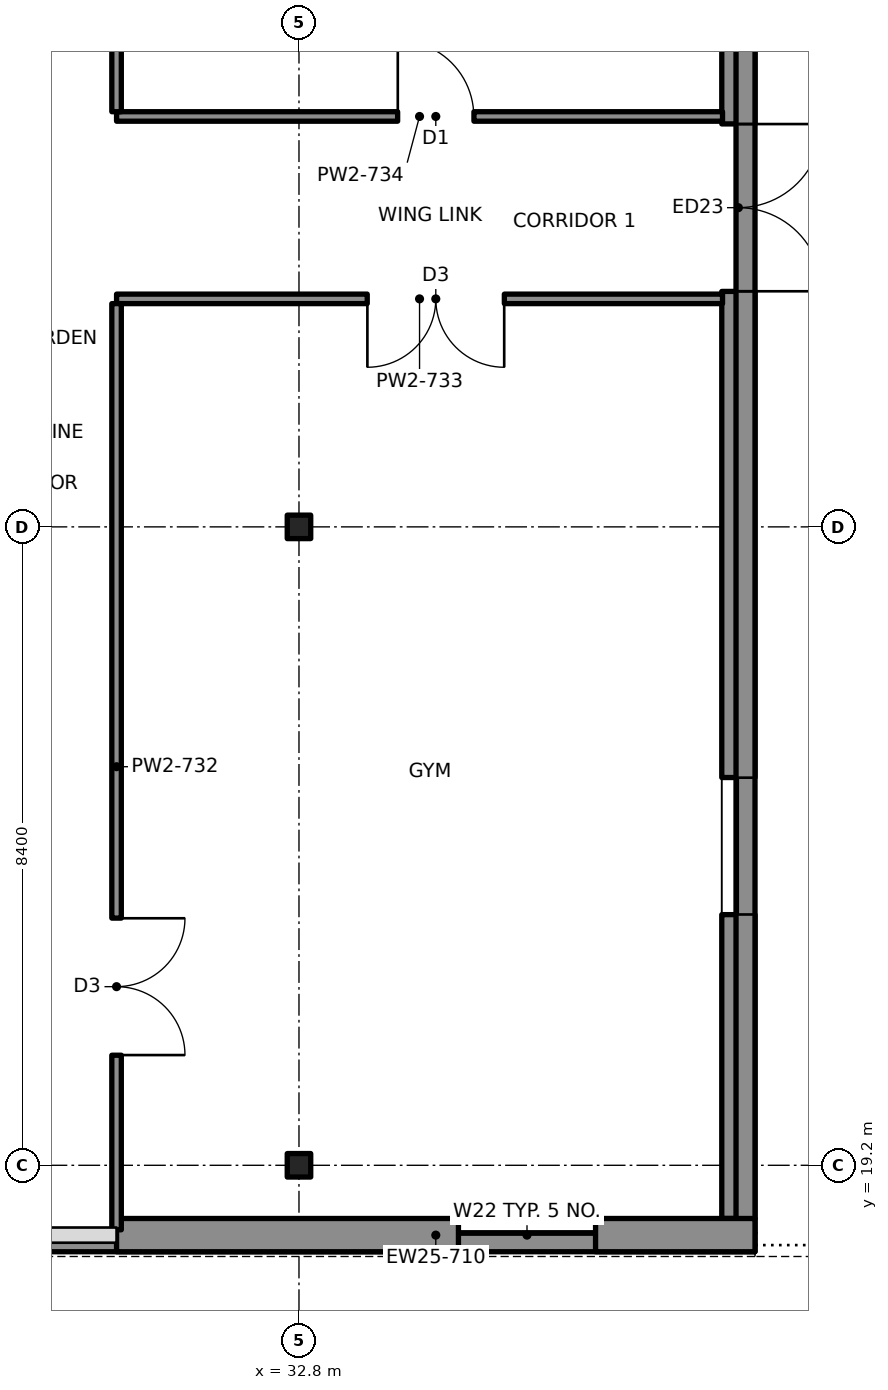
"""IFC4 building model, lengths in metres.
Left out: names, types, materials, properties, quantities, classifications, styles, units other than length and angle.
Written with IfcOpenShell. Run it as: python <this file> out.ifc"""

import sys

from ifc_helpers import new_model, si_unit, direction, frame, frame_2d, origin, origin_2d, place, context, subcontext, project, spatial, rectangle, i_section, extrude, element, fill, save


model = new_model("IFC4")
c1 = context("Model", 3, precision=1e-05, world=origin(), true_north=direction((0.0, 1.0)))
c2 = subcontext(c1, "Body", "Model", "MODEL_VIEW")
j1 = project(units=[si_unit("LENGTHUNIT", "METRE"), si_unit("PLANEANGLEUNIT", "RADIAN")], contexts=[c1])
p1 = place(None, origin())
s1 = spatial("IfcSite", under=j1, at=p1, CompositionType="ELEMENT")
p2 = place(p1, origin())
s2 = spatial("IfcBuilding", under=s1, at=p2, CompositionType="ELEMENT")
p3 = place(p2, frame((0.0, 0.0, 14.0)))
s3 = spatial("IfcBuildingStorey", under=s2, at=p3, CompositionType="ELEMENT", Elevation=14.0)
for number, where, z_axis, x_axis in (
    (1, (32.8, 19.2, 0.0), (0.0, 0.0, 1.0), (1.0, 0.0, 0.0)),
    (2, (32.8, 27.6, 0.0), (0.0, 0.0, 1.0), (1.0, 0.0, 0.0)),
):
    element("IfcColumn", number, at=place(p3, frame(where, z_axis=z_axis, x_axis=x_axis)), inside=s3, PredefinedType="COLUMN", context=c2, shape_type="SweptSolid", body=[
        extrude(i_section(OverallWidth=0.309, OverallDepth=0.323, WebThickness=0.014, FlangeThickness=0.023, at=origin_2d()), origin(), (0.0, 0.0, 1.0), 4.4),
    ])
p4 = place(p3, frame((30.4, 18.281, 0.0), z_axis=(0.0, 0.0, 1.0), x_axis=(1.0, 0.0, 0.0)))
e3 = element("IfcWall", 3, at=p4, inside=s3, PredefinedType="SOLIDWALL", context=c2, shape_type="SweptSolid", body=[
    extrude(rectangle(XDim=8.4, YDim=0.438, at=frame_2d((4.2, 0.0))), origin(), (0.0, 0.0, 1.0), 4.4),
])
p5 = place(p4, frame((4.5, 0.0, 0.75)))
e4 = element("IfcOpeningElement", 4, at=p5, cuts=e3, PredefinedType="OPENING", context=c2, shape_type="SweptSolid", body=[
    extrude(rectangle(XDim=1.8, YDim=2.8, at=frame_2d((0.9, 1.4))), frame((0.0, 0.229, 0.0), z_axis=(0.0, -1.0, 0.0), x_axis=(1.0, 0.0, 0.0)), (0.0, 0.0, 1.0), 0.458),
])
p6 = place(p3, frame((38.581, 18.5, 0.0), z_axis=(0.0, 0.0, 1.0), x_axis=(0.0, 1.0, 0.0)))
e5 = element("IfcWall", 5, at=p6, inside=s3, PredefinedType="SOLIDWALL", context=c2, shape_type="SweptSolid", body=[
    extrude(rectangle(XDim=35.0, YDim=0.438, at=frame_2d((17.5, 0.0))), origin(), (0.0, 0.0, 1.0), 4.4),
])
p7 = place(p6, frame((16.6, 0.0, 0.75)))
e6 = element("IfcOpeningElement", 6, at=p7, cuts=e5, PredefinedType="OPENING", context=c2, shape_type="SweptSolid", body=[
    extrude(rectangle(XDim=1.8, YDim=2.8, at=frame_2d((0.9, 1.4))), frame((0.0, 0.229, 0.0), z_axis=(0.0, -1.0, 0.0), x_axis=(1.0, 0.0, 0.0)), (0.0, 0.0, 1.0), 0.458),
])
p8 = place(p6, frame((4.0, 0.0, 0.75)))
e7 = element("IfcOpeningElement", 7, at=p8, cuts=e5, PredefinedType="OPENING", context=c2, shape_type="SweptSolid", body=[
    extrude(rectangle(XDim=1.8, YDim=2.8, at=frame_2d((0.9, 1.4))), frame((0.0, 0.229, 0.0), z_axis=(0.0, -1.0, 0.0), x_axis=(1.0, 0.0, 0.0)), (0.0, 0.0, 1.0), 0.458),
])
p9 = place(p6, frame((31.2, 0.0, 0.75)))
e8 = element("IfcOpeningElement", 8, at=p9, cuts=e5, PredefinedType="OPENING", context=c2, shape_type="SweptSolid", body=[
    extrude(rectangle(XDim=1.8, YDim=2.8, at=frame_2d((0.9, 1.4))), frame((0.0, 0.229, 0.0), z_axis=(0.0, -1.0, 0.0), x_axis=(1.0, 0.0, 0.0)), (0.0, 0.0, 1.0), 0.458),
])
p10 = place(p6, frame((12.2, 0.0, 0.0)))
e9 = element("IfcOpeningElement", 9, at=p10, cuts=e5, PredefinedType="OPENING", context=c2, shape_type="SweptSolid", body=[
    extrude(rectangle(XDim=2.2, YDim=2.4, at=frame_2d((1.1, 1.2))), frame((0.0, 0.229, 0.0), z_axis=(0.0, -1.0, 0.0), x_axis=(1.0, 0.0, 0.0)), (0.0, 0.0, 1.0), 0.458),
])
p11 = place(p6, frame((20.6, 0.0, 0.0)))
e10 = element("IfcOpeningElement", 10, at=p11, cuts=e5, PredefinedType="OPENING", context=c2, shape_type="SweptSolid", body=[
    extrude(rectangle(XDim=2.2, YDim=2.4, at=frame_2d((1.1, 1.2))), frame((0.0, 0.229, 0.0), z_axis=(0.0, -1.0, 0.0), x_axis=(1.0, 0.0, 0.0)), (0.0, 0.0, 1.0), 0.458),
])
p12 = place(p3, frame((10.062, 18.188, 4.4), z_axis=(0.0, 0.0, 1.0), x_axis=(1.0, 0.0, 0.0)))
e11 = element("IfcWall", 11, at=p12, inside=s3, PredefinedType="PARAPET", context=c2, shape_type="SweptSolid", body=[
    extrude(rectangle(XDim=28.738, YDim=0.25, at=frame_2d((14.369, 0.0))), origin(), (0.0, 0.0, 1.0), 1.1),
])
p13 = place(p3, frame((38.675, 18.312, 4.4), z_axis=(0.0, 0.0, 1.0), x_axis=(0.0, 1.0, 0.0)))
e12 = element("IfcWall", 12, at=p13, inside=s3, PredefinedType="PARAPET", context=c2, shape_type="SweptSolid", body=[
    extrude(rectangle(XDim=35.375, YDim=0.25, at=frame_2d((17.688, 0.0))), origin(), (0.0, 0.0, 1.0), 1.1),
])
p14 = place(p3, frame((30.4, 30.6, 0.0), z_axis=(0.0, 0.0, 1.0), x_axis=(1.0, 0.0, 0.0)))
e13 = element("IfcWall", 13, at=p14, inside=s3, PredefinedType="PARTITIONING", context=c2, shape_type="SweptSolid", body=[
    extrude(rectangle(XDim=7.973, YDim=0.125, at=frame_2d((3.986, 0.0))), origin(), (0.0, 0.0, 1.0), 3.65),
])
p15 = place(p14, frame((3.3, 0.0, 0.0)))
e14 = element("IfcOpeningElement", 14, at=p15, cuts=e13, PredefinedType="OPENING", context=c2, shape_type="SweptSolid", body=[
    extrude(rectangle(XDim=1.8, YDim=2.1, at=frame_2d((0.9, 1.05))), frame((0.0, 0.073, 0.0), z_axis=(0.0, -1.0, 0.0), x_axis=(1.0, 0.0, 0.0)), (0.0, 0.0, 1.0), 0.145),
])
p16 = place(p3, frame((30.4, 33.0, 0.0), z_axis=(0.0, 0.0, 1.0), x_axis=(1.0, 0.0, 0.0)))
e15 = element("IfcWall", 15, at=p16, inside=s3, PredefinedType="PARTITIONING", context=c2, shape_type="SweptSolid", body=[
    extrude(rectangle(XDim=7.973, YDim=0.125, at=frame_2d((3.986, 0.0))), origin(), (0.0, 0.0, 1.0), 3.65),
])
p17 = place(p16, frame((3.7, 0.0, 0.0)))
e16 = element("IfcOpeningElement", 16, at=p17, cuts=e15, PredefinedType="OPENING", context=c2, shape_type="SweptSolid", body=[
    extrude(rectangle(XDim=1.0, YDim=2.1, at=frame_2d((0.5, 1.05))), frame((0.0, 0.073, 0.0), z_axis=(0.0, -1.0, 0.0), x_axis=(1.0, 0.0, 0.0)), (0.0, 0.0, 1.0), 0.145),
])
p18 = place(p3, frame((30.4, 18.351, 0.0), z_axis=(0.0, 0.0, 1.0), x_axis=(0.0, 1.0, 0.0)))
e17 = element("IfcWall", 17, at=p18, inside=s3, PredefinedType="PARTITIONING", context=c2, shape_type="SweptSolid", body=[
    extrude(rectangle(XDim=12.186, YDim=0.125, at=frame_2d((6.093, 0.0))), origin(), (0.0, 0.0, 1.0), 3.65),
])
p19 = place(p18, frame((2.299, 0.0, 0.0)))
e18 = element("IfcOpeningElement", 18, at=p19, cuts=e17, PredefinedType="OPENING", context=c2, shape_type="SweptSolid", body=[
    extrude(rectangle(XDim=1.8, YDim=2.1, at=frame_2d((0.9, 1.05))), frame((0.0, 0.073, 0.0), z_axis=(0.0, -1.0, 0.0), x_axis=(1.0, 0.0, 0.0)), (0.0, 0.0, 1.0), 0.145),
])
p20 = place(p3, frame((30.4, 33.062, 0.0), z_axis=(0.0, 0.0, 1.0), x_axis=(0.0, 1.0, 0.0)))
e19 = element("IfcWall", 19, at=p20, inside=s3, PredefinedType="PARTITIONING", context=c2, shape_type="SweptSolid", body=[
    extrude(rectangle(XDim=5.875, YDim=0.125, at=frame_2d((2.938, 0.0))), origin(), (0.0, 0.0, 1.0), 3.65),
])
p21 = place(p5, origin())
e20 = element("IfcWindow", 20, at=p21, inside=s3, PartitioningType="SINGLE_PANEL", PredefinedType="WINDOW", context=c2, shape_type="SweptSolid", body=[
    extrude(rectangle(XDim=1.8, YDim=2.8, at=frame_2d((0.9, 1.4))), frame((0.0, 0.03, 0.0), z_axis=(0.0, -1.0, 0.0), x_axis=(1.0, 0.0, 0.0)), (0.0, 0.0, 1.0), 0.06),
])
fill(e4, e20)
p22 = place(p8, origin())
e21 = element("IfcWindow", 21, at=p22, inside=s3, PartitioningType="SINGLE_PANEL", PredefinedType="WINDOW", context=c2, shape_type="SweptSolid", body=[
    extrude(rectangle(XDim=1.8, YDim=2.8, at=frame_2d((0.9, 1.4))), frame((0.0, 0.03, 0.0), z_axis=(0.0, -1.0, 0.0), x_axis=(1.0, 0.0, 0.0)), (0.0, 0.0, 1.0), 0.06),
])
fill(e7, e21)
p23 = place(p10, origin())
e22 = element("IfcDoor", 22, at=p23, inside=s3, OperationType="DOUBLE_DOOR_SINGLE_SWING", PredefinedType="DOOR", context=c2, shape_type="SweptSolid", body=[
    extrude(rectangle(XDim=2.2, YDim=2.4, at=frame_2d((1.1, 1.2))), frame((0.0, 0.025, 0.0), z_axis=(0.0, -1.0, 0.0), x_axis=(1.0, 0.0, 0.0)), (0.0, 0.0, 1.0), 0.05),
])
fill(e9, e22)
p24 = place(p19, origin())
e23 = element("IfcDoor", 23, at=p24, inside=s3, OperationType="DOUBLE_DOOR_SINGLE_SWING", PredefinedType="DOOR", context=c2, shape_type="SweptSolid", body=[
    extrude(rectangle(XDim=1.8, YDim=2.1, at=frame_2d((0.9, 1.05))), frame((0.0, 0.025, 0.0), z_axis=(0.0, -1.0, 0.0), x_axis=(1.0, 0.0, 0.0)), (0.0, 0.0, 1.0), 0.05),
])
fill(e18, e23)
p25 = place(p17, origin())
e24 = element("IfcDoor", 24, at=p25, inside=s3, OperationType="SINGLE_SWING_LEFT", PredefinedType="DOOR", context=c2, shape_type="SweptSolid", body=[
    extrude(rectangle(XDim=1.0, YDim=2.1, at=frame_2d((0.5, 1.05))), frame((0.0, 0.025, 0.0), z_axis=(0.0, -1.0, 0.0), x_axis=(1.0, 0.0, 0.0)), (0.0, 0.0, 1.0), 0.05),
])
fill(e16, e24)
p26 = place(p15, origin())
e25 = element("IfcDoor", 25, at=p26, inside=s3, OperationType="DOUBLE_DOOR_SINGLE_SWING", PredefinedType="DOOR", context=c2, shape_type="SweptSolid", body=[
    extrude(rectangle(XDim=1.8, YDim=2.1, at=frame_2d((0.9, 1.05))), frame((0.0, 0.025, 0.0), z_axis=(0.0, -1.0, 0.0), x_axis=(1.0, 0.0, 0.0)), (0.0, 0.0, 1.0), 0.05),
])
fill(e14, e25)
save(model, sys.argv[1])
